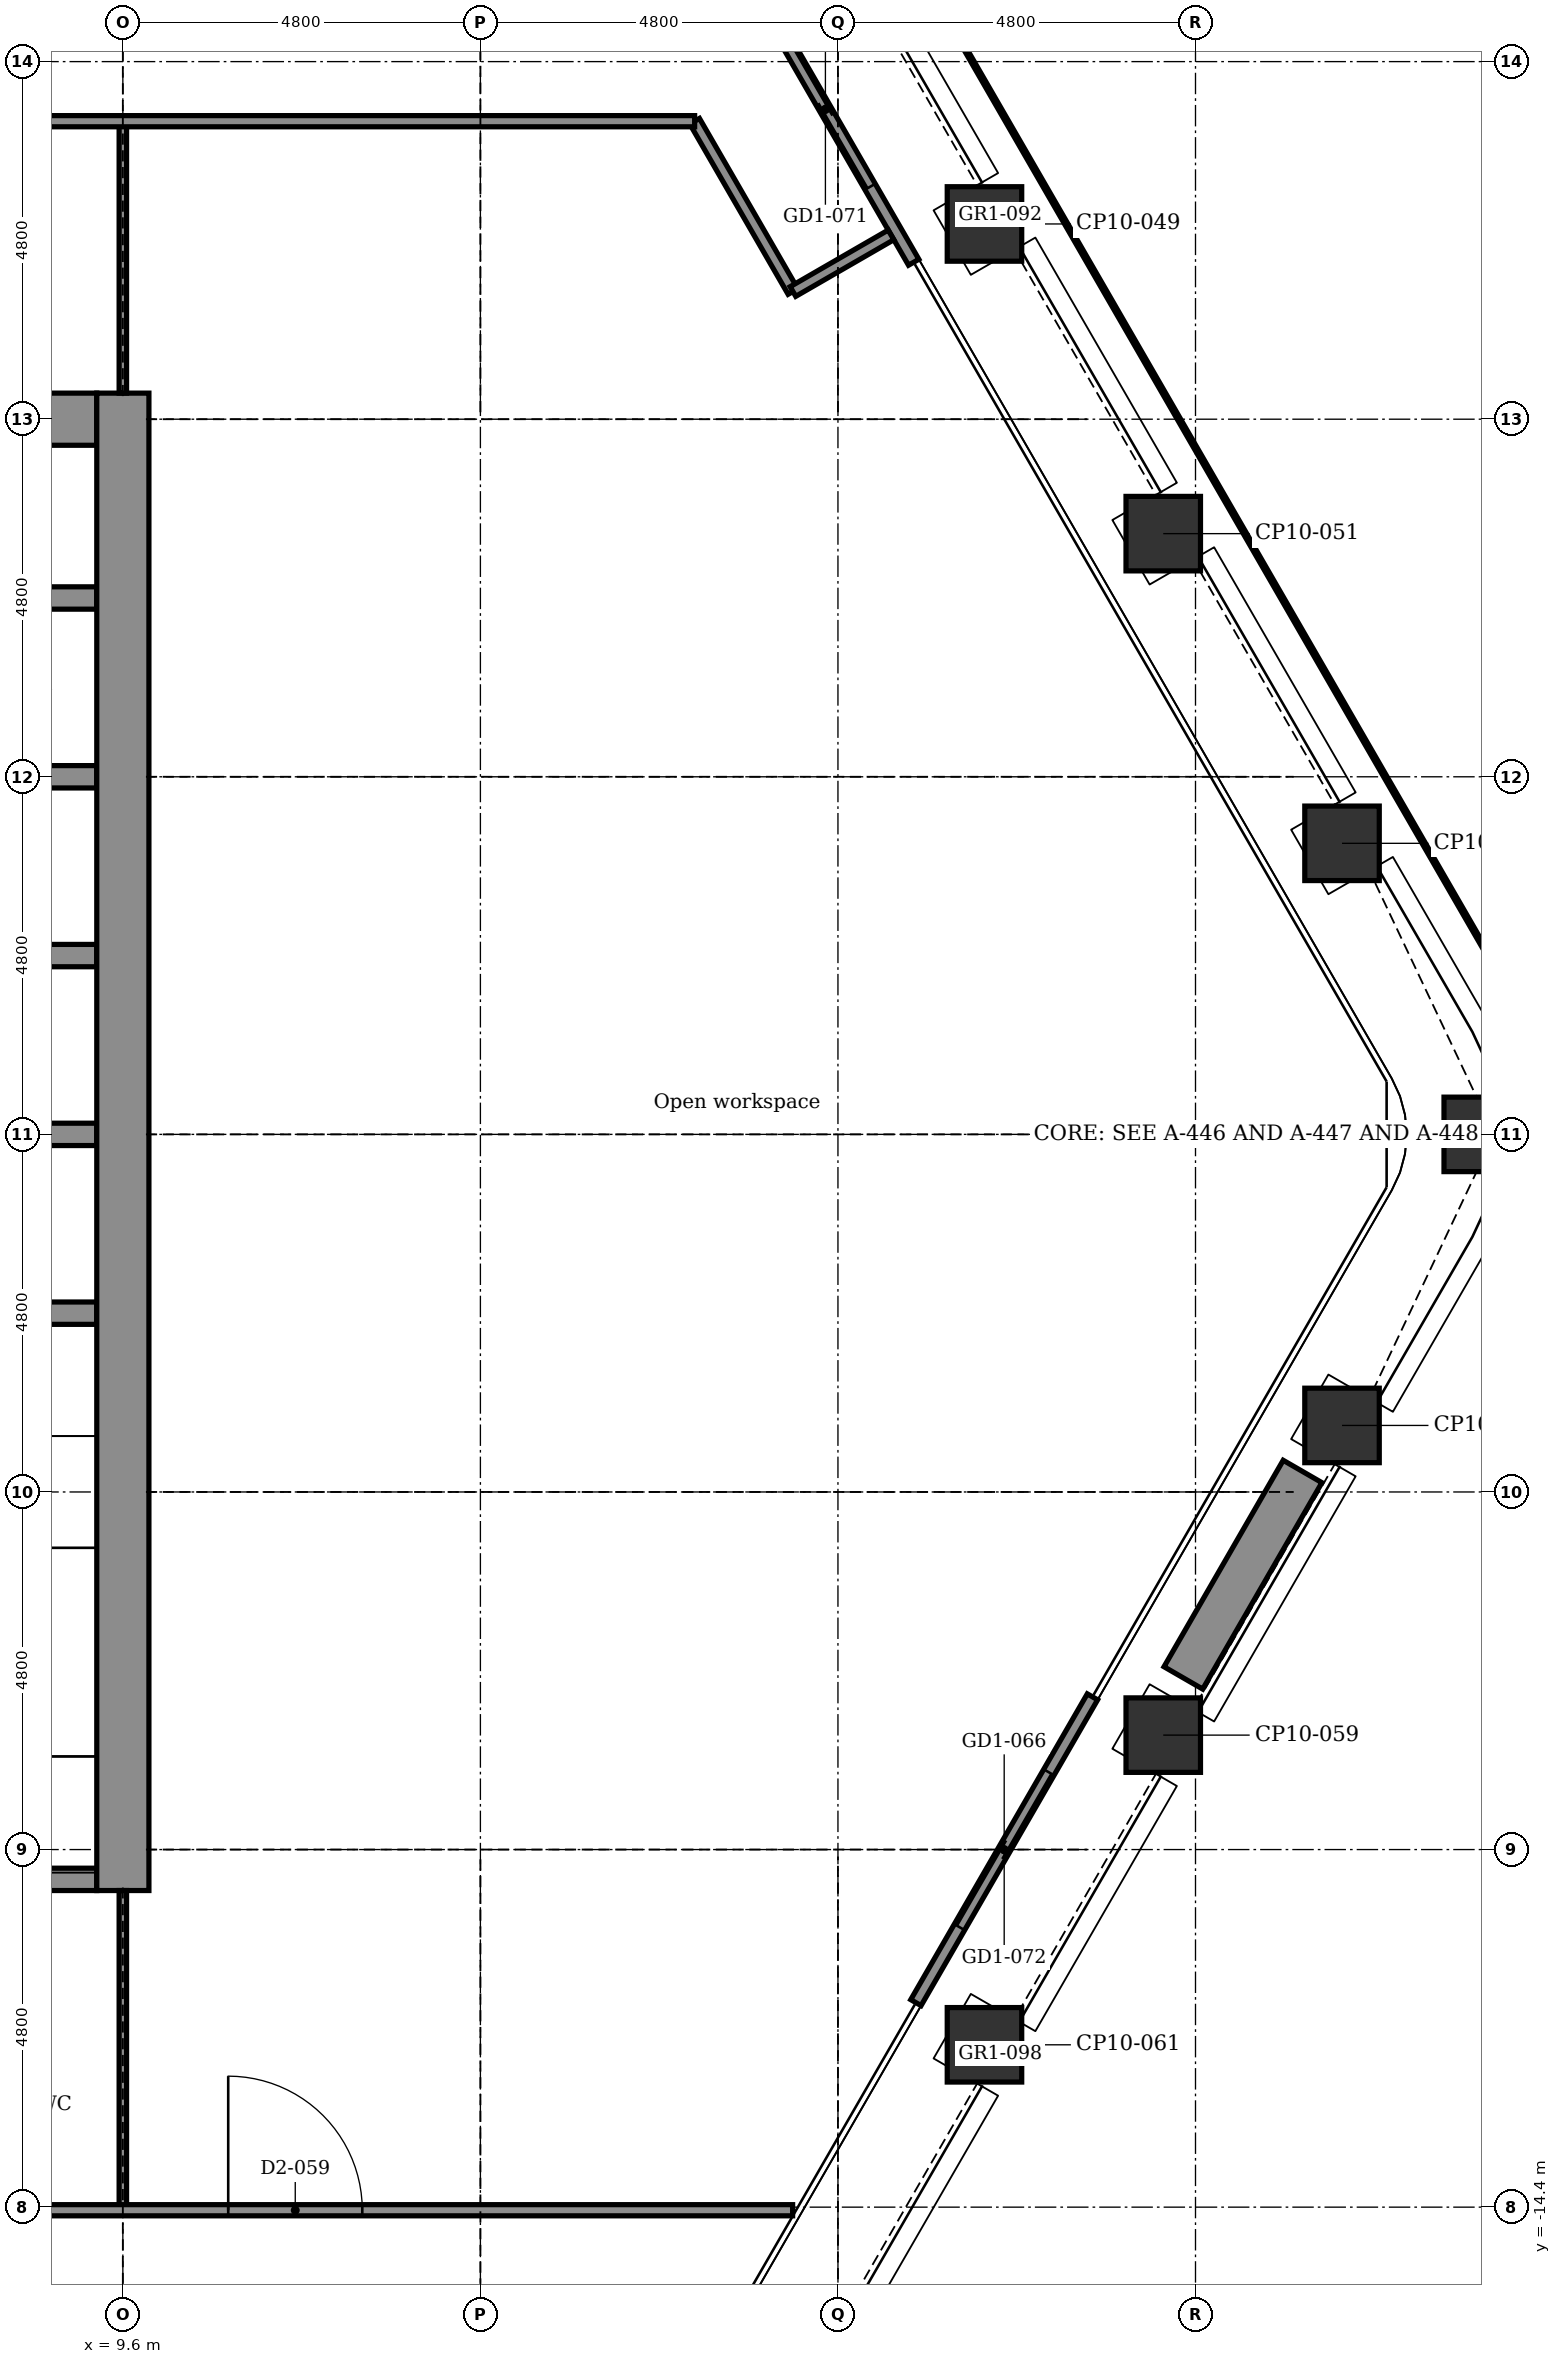
"""IFC4 building model, lengths in metres.
Left out: names, types, materials, properties, quantities, classifications, styles, units other than length and angle.
Written with IfcOpenShell. Run it as: python <this file> out.ifc"""

import sys

from ifc_helpers import new_model, si_unit, direction, frame, frame_2d, origin, origin_2d, place, context, subcontext, project, spatial, rectangle, extrude, element, fill, save


model = new_model("IFC4")
c1 = context("Model", 3, precision=1e-05, world=origin(), true_north=direction((0.0, 1.0)))
c2 = subcontext(c1, "Body", "Model", "MODEL_VIEW")
j1 = project(units=[si_unit("LENGTHUNIT", "METRE"), si_unit("PLANEANGLEUNIT", "RADIAN")], contexts=[c1])
p1 = place(None, origin())
s1 = spatial("IfcSite", under=j1, at=p1, CompositionType="ELEMENT")
p2 = place(p1, origin())
s2 = spatial("IfcBuilding", under=s1, at=p2, CompositionType="ELEMENT")
p3 = place(p2, frame((0.0, 0.0, 201.2)))
s3 = spatial("IfcBuildingStorey", under=s2, at=p3, CompositionType="ELEMENT", Elevation=201.2)
for number, where, z_axis, x_axis in (
    (1, (21.167, 12.221, -0.15), (0.0, 0.0, 1.0), (0.866, 0.5, 0.0)),
    (2, (23.567, 8.064, -0.15), (0.0, 0.0, 1.0), (0.866, 0.5, 0.0)),
    (3, (25.967, 3.907, -0.15), (0.0, 0.0, 1.0), (0.866, 0.5, 0.0)),
    (4, (27.836, 0.0, -0.15), (0.0, 0.0, 1.0), (1.0, 0.0, 0.0)),
    (5, (25.967, -3.907, -0.15), (0.0, 0.0, 1.0), (0.5, 0.866, 0.0)),
    (6, (23.567, -8.064, -0.15), (0.0, 0.0, 1.0), (0.5, 0.866, 0.0)),
    (7, (21.167, -12.221, -0.15), (0.0, 0.0, 1.0), (0.5, 0.866, 0.0)),
):
    element("IfcColumn", number, at=place(p3, frame(where, z_axis=z_axis, x_axis=x_axis)), inside=s3, PredefinedType="COLUMN", context=c2, shape_type="SweptSolid", body=[
        extrude(rectangle(XDim=1.0, YDim=1.0, at=origin_2d()), origin(), (0.0, 0.0, 1.0), 3.9),
    ])
p4 = place(p3, frame((4.95, -10.0, -0.15), z_axis=(0.0, 0.0, 1.0), x_axis=(1.0, 0.0, 0.0)))
e8 = element("IfcWall", 8, at=p4, inside=s3, PredefinedType="STANDARD", context=c2, shape_type="SweptSolid", body=[
    extrude(rectangle(XDim=4.3, YDim=0.3, at=frame_2d((2.15, 0.0))), origin(), (0.0, 0.0, 1.0), 3.9),
])
for number, where, z_axis, x_axis in (
    (9, (6.15, -2.4, -0.15), (0.0, 0.0, 1.0), (1.0, 0.0, 0.0)),
    (10, (6.15, 0.0, -0.15), (0.0, 0.0, 1.0), (1.0, 0.0, 0.0)),
    (11, (6.15, 2.4, -0.15), (0.0, 0.0, 1.0), (1.0, 0.0, 0.0)),
    (12, (6.15, 4.8, -0.15), (0.0, 0.0, 1.0), (1.0, 0.0, 0.0)),
):
    element("IfcWall", number, at=place(p3, frame(where, z_axis=z_axis, x_axis=x_axis)), inside=s3, PredefinedType="STANDARD", context=c2, shape_type="SweptSolid", body=[
        extrude(rectangle(XDim=3.1, YDim=0.3, at=frame_2d((1.55, 0.0))), origin(), (0.0, 0.0, 1.0), 3.9),
    ])
p5 = place(p3, frame((6.0, 7.2, -0.15), z_axis=(0.0, 0.0, 1.0), x_axis=(1.0, 0.0, 0.0)))
e13 = element("IfcWall", 13, at=p5, inside=s3, PredefinedType="STANDARD", context=c2, shape_type="SweptSolid", body=[
    extrude(rectangle(XDim=3.25, YDim=0.3, at=frame_2d((1.625, 0.0))), origin(), (0.0, 0.0, 1.0), 3.9),
])
p6 = place(p3, frame((-5.25, 9.6, -0.15), z_axis=(0.0, 0.0, 1.0), x_axis=(1.0, 0.0, 0.0)))
e14 = element("IfcWall", 14, at=p6, inside=s3, PredefinedType="SHEAR", context=c2, shape_type="SweptSolid", body=[
    extrude(rectangle(XDim=14.5, YDim=0.7, at=frame_2d((7.25, 0.0))), origin(), (0.0, 0.0, 1.0), 3.9),
])
p7 = place(p6, frame((0.6, 0.0, 0.15)))
e15 = element("IfcOpeningElement", 15, at=p7, cuts=e14, PredefinedType="OPENING", context=c2, shape_type="SweptSolid", body=[
    extrude(rectangle(XDim=0.9, YDim=2.1, at=frame_2d((0.45, 1.05))), frame((0.0, 0.36, 0.0), z_axis=(0.0, -1.0, 0.0), x_axis=(1.0, 0.0, 0.0)), (0.0, 0.0, 1.0), 0.72),
])
p8 = place(p3, frame((9.6, -10.15, -0.15), z_axis=(0.0, 0.0, 1.0), x_axis=(0.0, 1.0, 0.0)))
e16 = element("IfcWall", 16, at=p8, inside=s3, PredefinedType="SHEAR", context=c2, shape_type="SweptSolid", body=[
    extrude(rectangle(XDim=20.1, YDim=0.7, at=frame_2d((10.05, 0.0))), origin(), (0.0, 0.0, 1.0), 3.9),
])
p9 = place(p3, frame((17.847, 15.812, 0.0), z_axis=(0.0, 0.0, 1.0), x_axis=(0.5000167099, -0.866015756104, 0.0)))
e17 = element("IfcWall", 17, at=p9, inside=s3, PredefinedType="PARTITIONING", context=c2, shape_type="SweptSolid", body=[
    extrude(rectangle(XDim=4.74, YDim=0.16, at=frame_2d((2.37, 0.0))), origin(), (0.0, 0.0, 1.0), 3.75),
])
p10 = place(p9, frame((1.17, 0.0, 0.0)))
e18 = element("IfcOpeningElement", 18, at=p10, cuts=e17, PredefinedType="OPENING", context=c2, shape_type="SweptSolid", body=[
    extrude(rectangle(XDim=2.4, YDim=2.4, at=frame_2d((1.2, 1.2))), frame((0.0, 0.09, 0.0), z_axis=(0.0, -1.0, 0.0), x_axis=(1.0, 0.0, 0.0)), (0.0, 0.0, 1.0), 0.18),
])
p11 = place(p3, frame((22.617, -7.55, 0.0), z_axis=(0.0, 0.0, 1.0), x_axis=(-0.5000167099, -0.866015756104, 0.0)))
e19 = element("IfcWall", 19, at=p11, inside=s3, PredefinedType="PARTITIONING", context=c2, shape_type="SweptSolid", body=[
    extrude(rectangle(XDim=4.74, YDim=0.16, at=frame_2d((2.37, 0.0))), origin(), (0.0, 0.0, 1.0), 3.75),
])
p12 = place(p11, frame((1.17, 0.0, 0.0)))
e20 = element("IfcOpeningElement", 20, at=p12, cuts=e19, PredefinedType="OPENING", context=c2, shape_type="SweptSolid", body=[
    extrude(rectangle(XDim=2.4, YDim=2.4, at=frame_2d((1.2, 1.2))), frame((0.0, 0.09, 0.0), z_axis=(0.0, -1.0, 0.0), x_axis=(1.0, 0.0, 0.0)), (0.0, 0.0, 1.0), 0.18),
])
p13 = place(p3, frame((25.437, -4.525, 0.0), z_axis=(0.0, 0.0, 1.0), x_axis=(-0.499938187974, -0.866061088033, 0.0)))
e21 = element("IfcWall", 21, at=p13, inside=s3, PredefinedType="USERDEFINED", context=c2, shape_type="SweptSolid", body=[
    extrude(rectangle(XDim=3.2, YDim=0.6, at=frame_2d((1.6, 0.0))), origin(), (0.0, 0.0, 1.0), 0.7),
])
p14 = place(p3, frame((9.6, -14.441, 0.0), z_axis=(0.0, 0.0, 1.0), x_axis=(0.0, 1.0, 0.0)))
e22 = element("IfcWall", 22, at=p14, inside=s3, PredefinedType="PARTITIONING", context=c2, shape_type="SweptSolid", body=[
    extrude(rectangle(XDim=4.292, YDim=0.1, at=frame_2d((2.146, 0.0))), origin(), (0.0, 0.0, 1.0), 3.066),
])
p15 = place(p3, frame((9.6, 9.95, 0.0), z_axis=(0.0, 0.0, 1.0), x_axis=(0.0, 1.0, 0.0)))
e23 = element("IfcWall", 23, at=p15, inside=s3, PredefinedType="PARTITIONING", context=c2, shape_type="SweptSolid", body=[
    extrude(rectangle(XDim=3.65, YDim=0.1, at=frame_2d((1.825, 0.0))), origin(), (0.0, 0.0, 1.0), 3.066),
])
p16 = place(p3, frame((17.276, 13.6, 0.0), z_axis=(0.0, 0.0, 1.0), x_axis=(0.499938597367, -0.866060851709, 0.0)))
e24 = element("IfcWall", 24, at=p16, inside=s3, PredefinedType="PARTITIONING", context=c2, shape_type="SweptSolid", body=[
    extrude(rectangle(XDim=2.64, YDim=0.15, at=frame_2d((1.32, 0.0))), origin(), (0.0, 0.0, 1.0), 3.75),
])
p17 = place(p3, frame((18.596, 11.314, 0.0), z_axis=(0.0, 0.0, 1.0), x_axis=(0.866030456496, 0.499991248344, 0.0)))
e25 = element("IfcWall", 25, at=p17, inside=s3, PredefinedType="PARTITIONING", context=c2, shape_type="SweptSolid", body=[
    extrude(rectangle(XDim=1.52, YDim=0.15, at=frame_2d((0.76, 0.0))), origin(), (0.0, 0.0, 1.0), 3.75),
])
p18 = place(p3, frame((6.0, -14.441, 0.0), z_axis=(0.0, 0.0, 1.0), x_axis=(1.0, 0.0, 0.0)))
e26 = element("IfcWall", 26, at=p18, inside=s3, PredefinedType="PARTITIONING", context=c2, shape_type="SweptSolid", body=[
    extrude(rectangle(XDim=12.592, YDim=0.15, at=frame_2d((6.296, 0.0))), origin(), (0.0, 0.0, 1.0), 3.75),
])
p19 = place(p18, frame((5.014, 0.0, 0.0)))
e27 = element("IfcOpeningElement", 27, at=p19, cuts=e26, PredefinedType="OPENING", context=c2, shape_type="SweptSolid", body=[
    extrude(rectangle(XDim=1.8, YDim=2.1, at=frame_2d((0.9, 1.05))), frame((0.0, 0.085, 0.0), z_axis=(0.0, -1.0, 0.0), x_axis=(1.0, 0.0, 0.0)), (0.0, 0.0, 1.0), 0.17),
])
p20 = place(p3, frame((-1.8, 13.6, 0.0), z_axis=(0.0, 0.0, 1.0), x_axis=(1.0, 0.0, 0.0)))
e28 = element("IfcWall", 28, at=p20, inside=s3, PredefinedType="PARTITIONING", context=c2, shape_type="SweptSolid", body=[
    extrude(rectangle(XDim=19.076, YDim=0.15, at=frame_2d((9.538, 0.0))), origin(), (0.0, 0.0, 1.0), 3.75),
])
p21 = place(p20, frame((2.8, 0.0, 0.0)))
e29 = element("IfcOpeningElement", 29, at=p21, cuts=e28, PredefinedType="OPENING", context=c2, shape_type="SweptSolid", body=[
    extrude(rectangle(XDim=1.0, YDim=2.1, at=frame_2d((0.5, 1.05))), frame((0.0, 0.085, 0.0), z_axis=(0.0, -1.0, 0.0), x_axis=(1.0, 0.0, 0.0)), (0.0, 0.0, 1.0), 0.17),
])
p22 = place(p20, frame((8.5, 0.0, 0.0)))
e30 = element("IfcOpeningElement", 30, at=p22, cuts=e28, PredefinedType="OPENING", context=c2, shape_type="SweptSolid", body=[
    extrude(rectangle(XDim=1.0, YDim=2.1, at=frame_2d((0.5, 1.05))), frame((0.0, 0.085, 0.0), z_axis=(0.0, -1.0, 0.0), x_axis=(1.0, 0.0, 0.0)), (0.0, 0.0, 1.0), 0.17),
])
p23 = place(p10, origin())
e31 = element("IfcDoor", 31, at=p23, inside=s3, OperationType="DOUBLE_DOOR_SLIDING", PredefinedType="DOOR", context=c2, shape_type="SweptSolid", body=[
    extrude(rectangle(XDim=2.4, YDim=2.4, at=frame_2d((1.2, 1.2))), frame((0.0, 0.025, 0.0), z_axis=(0.0, -1.0, 0.0), x_axis=(1.0, 0.0, 0.0)), (0.0, 0.0, 1.0), 0.05),
])
fill(e18, e31)
p24 = place(p12, origin())
e32 = element("IfcDoor", 32, at=p24, inside=s3, OperationType="DOUBLE_DOOR_SLIDING", PredefinedType="DOOR", context=c2, shape_type="SweptSolid", body=[
    extrude(rectangle(XDim=2.4, YDim=2.4, at=frame_2d((1.2, 1.2))), frame((0.0, 0.025, 0.0), z_axis=(0.0, -1.0, 0.0), x_axis=(1.0, 0.0, 0.0)), (0.0, 0.0, 1.0), 0.05),
])
fill(e20, e32)
p25 = place(p19, origin())
e33 = element("IfcDoor", 33, at=p25, inside=s3, OperationType="SINGLE_SWING_LEFT", PredefinedType="DOOR", context=c2, shape_type="SweptSolid", body=[
    extrude(rectangle(XDim=1.8, YDim=2.1, at=frame_2d((0.9, 1.05))), frame((0.0, 0.025, 0.0), z_axis=(0.0, -1.0, 0.0), x_axis=(1.0, 0.0, 0.0)), (0.0, 0.0, 1.0), 0.05),
])
fill(e27, e33)
save(model, sys.argv[1])
